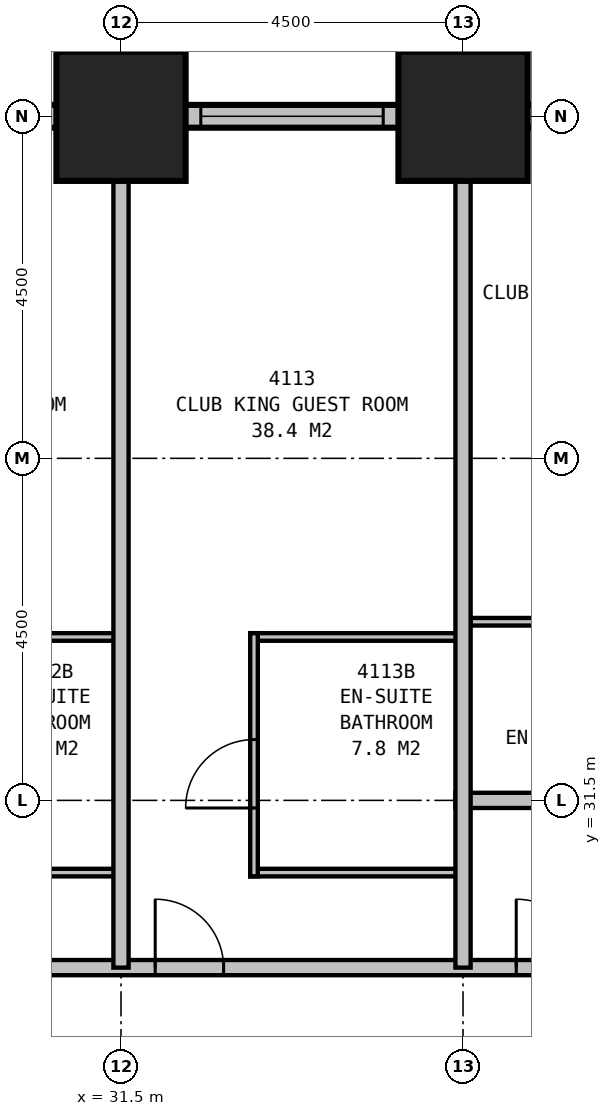
"""IFC4 building model, lengths in metres.
Left out: names, types, materials, properties, quantities, classifications, styles, units other than length and angle.
Written with IfcOpenShell. Run it as: python <this file> out.ifc"""

import sys

from ifc_helpers import new_model, si_unit, direction, frame, frame_2d, origin, origin_2d, place, context, subcontext, project, spatial, rectangle, extrude, element, fill, save


model = new_model("IFC4")
c1 = context("Model", 3, precision=1e-05, world=origin(), true_north=direction((0.0, 1.0)))
c2 = subcontext(c1, "Body", "Model", "MODEL_VIEW")
j1 = project(units=[si_unit("LENGTHUNIT", "METRE"), si_unit("PLANEANGLEUNIT", "RADIAN")], contexts=[c1])
p1 = place(None, origin())
s1 = spatial("IfcSite", under=j1, at=p1, CompositionType="ELEMENT")
p2 = place(p1, origin())
s2 = spatial("IfcBuilding", under=s1, at=p2, CompositionType="ELEMENT")
p3 = place(p2, frame((0.0, 0.0, 162.4)))
s3 = spatial("IfcBuildingStorey", under=s2, at=p3, CompositionType="ELEMENT", Elevation=162.4)
for number, where, z_axis, x_axis in (
    (1, (36.0, 40.5, 0.0), (0.0, 0.0, 1.0), (1.0, 0.0, 0.0)),
    (2, (31.5, 40.5, 0.0), (0.0, 0.0, 1.0), (1.0, 0.0, 0.0)),
):
    element("IfcColumn", number, at=place(p3, frame(where, z_axis=z_axis, x_axis=x_axis)), inside=s3, PredefinedType="COLUMN", context=c2, shape_type="SweptSolid", body=[
        extrude(rectangle(XDim=1.7, YDim=1.7, at=origin_2d()), origin(), (0.0, 0.0, 1.0), 3.5),
    ])
p4 = place(p3, frame((40.65, 40.5, 0.0), z_axis=(0.0, 0.0, 1.0), x_axis=(-1.0, 0.0, 0.0)))
e3 = element("IfcWall", 3, at=p4, inside=s3, PredefinedType="STANDARD", context=c2, shape_type="SweptSolid", body=[
    extrude(rectangle(XDim=31.8, YDim=0.3, at=frame_2d((15.9, 0.0))), origin(), (0.0, 0.0, 1.0), 2.25),
])
p5 = place(p4, frame((1.2, 0.0, 0.5)))
e4 = element("IfcOpeningElement", 4, at=p5, cuts=e3, PredefinedType="OPENING", context=c2, shape_type="SweptSolid", body=[
    extrude(rectangle(XDim=2.4, YDim=1.6, at=frame_2d((1.2, 0.8))), frame((0.0, 0.16, 0.0), z_axis=(0.0, -1.0, 0.0), x_axis=(1.0, 0.0, 0.0)), (0.0, 0.0, 1.0), 0.32),
])
p6 = place(p4, frame((5.7, 0.0, 0.5)))
e5 = element("IfcOpeningElement", 5, at=p6, cuts=e3, PredefinedType="OPENING", context=c2, shape_type="SweptSolid", body=[
    extrude(rectangle(XDim=2.4, YDim=1.6, at=frame_2d((1.2, 0.8))), frame((0.0, 0.16, 0.0), z_axis=(0.0, -1.0, 0.0), x_axis=(1.0, 0.0, 0.0)), (0.0, 0.0, 1.0), 0.32),
])
p7 = place(p4, frame((10.2, 0.0, 0.5)))
e6 = element("IfcOpeningElement", 6, at=p7, cuts=e3, PredefinedType="OPENING", context=c2, shape_type="SweptSolid", body=[
    extrude(rectangle(XDim=2.4, YDim=1.6, at=frame_2d((1.2, 0.8))), frame((0.0, 0.16, 0.0), z_axis=(0.0, -1.0, 0.0), x_axis=(1.0, 0.0, 0.0)), (0.0, 0.0, 1.0), 0.32),
])
p8 = place(p4, frame((14.7, 0.0, 0.5)))
e7 = element("IfcOpeningElement", 7, at=p8, cuts=e3, PredefinedType="OPENING", context=c2, shape_type="SweptSolid", body=[
    extrude(rectangle(XDim=2.4, YDim=1.6, at=frame_2d((1.2, 0.8))), frame((0.0, 0.16, 0.0), z_axis=(0.0, -1.0, 0.0), x_axis=(1.0, 0.0, 0.0)), (0.0, 0.0, 1.0), 0.32),
])
p9 = place(p4, frame((19.2, 0.0, 0.5)))
e8 = element("IfcOpeningElement", 8, at=p9, cuts=e3, PredefinedType="OPENING", context=c2, shape_type="SweptSolid", body=[
    extrude(rectangle(XDim=2.4, YDim=1.6, at=frame_2d((1.2, 0.8))), frame((0.0, 0.16, 0.0), z_axis=(0.0, -1.0, 0.0), x_axis=(1.0, 0.0, 0.0)), (0.0, 0.0, 1.0), 0.32),
])
p10 = place(p4, frame((23.7, 0.0, 0.5)))
e9 = element("IfcOpeningElement", 9, at=p10, cuts=e3, PredefinedType="OPENING", context=c2, shape_type="SweptSolid", body=[
    extrude(rectangle(XDim=2.4, YDim=1.6, at=frame_2d((1.2, 0.8))), frame((0.0, 0.16, 0.0), z_axis=(0.0, -1.0, 0.0), x_axis=(1.0, 0.0, 0.0)), (0.0, 0.0, 1.0), 0.32),
])
p11 = place(p4, frame((28.2, 0.0, 0.5)))
e10 = element("IfcOpeningElement", 10, at=p11, cuts=e3, PredefinedType="OPENING", context=c2, shape_type="SweptSolid", body=[
    extrude(rectangle(XDim=2.4, YDim=1.6, at=frame_2d((1.2, 0.8))), frame((0.0, 0.16, 0.0), z_axis=(0.0, -1.0, 0.0), x_axis=(1.0, 0.0, 0.0)), (0.0, 0.0, 1.0), 0.32),
])
p12 = place(p3, frame((11.2, 29.3, 0.0), z_axis=(0.0, 0.0, 1.0), x_axis=(1.0, 0.0, 0.0)))
e11 = element("IfcWall", 11, at=p12, inside=s3, PredefinedType="PARTITIONING", context=c2, shape_type="SweptSolid", body=[
    extrude(rectangle(XDim=27.1, YDim=0.2, at=frame_2d((13.55, 0.0))), origin(), (0.0, 0.0, 1.0), 3.25),
])
p13 = place(p12, frame((2.75, 0.0, 0.0)))
e12 = element("IfcOpeningElement", 12, at=p13, cuts=e11, PredefinedType="OPENING", context=c2, shape_type="SweptSolid", body=[
    extrude(rectangle(XDim=0.9, YDim=2.1, at=frame_2d((0.45, 1.05))), frame((0.0, 0.11, 0.0), z_axis=(0.0, -1.0, 0.0), x_axis=(1.0, 0.0, 0.0)), (0.0, 0.0, 1.0), 0.22),
])
p14 = place(p12, frame((9.55, 0.0, 0.0)))
e13 = element("IfcOpeningElement", 13, at=p14, cuts=e11, PredefinedType="OPENING", context=c2, shape_type="SweptSolid", body=[
    extrude(rectangle(XDim=0.9, YDim=2.1, at=frame_2d((0.45, 1.05))), frame((0.0, 0.11, 0.0), z_axis=(0.0, -1.0, 0.0), x_axis=(1.0, 0.0, 0.0)), (0.0, 0.0, 1.0), 0.22),
])
p15 = place(p12, frame((16.25, 0.0, 0.0)))
e14 = element("IfcOpeningElement", 14, at=p15, cuts=e11, PredefinedType="OPENING", context=c2, shape_type="SweptSolid", body=[
    extrude(rectangle(XDim=0.9, YDim=2.1, at=frame_2d((0.45, 1.05))), frame((0.0, 0.11, 0.0), z_axis=(0.0, -1.0, 0.0), x_axis=(1.0, 0.0, 0.0)), (0.0, 0.0, 1.0), 0.22),
])
p16 = place(p12, frame((20.75, 0.0, 0.0)))
e15 = element("IfcOpeningElement", 15, at=p16, cuts=e11, PredefinedType="OPENING", context=c2, shape_type="SweptSolid", body=[
    extrude(rectangle(XDim=0.9, YDim=2.1, at=frame_2d((0.45, 1.05))), frame((0.0, 0.11, 0.0), z_axis=(0.0, -1.0, 0.0), x_axis=(1.0, 0.0, 0.0)), (0.0, 0.0, 1.0), 0.22),
])
p17 = place(p12, frame((25.5, 0.0, 0.0)))
e16 = element("IfcOpeningElement", 16, at=p17, cuts=e11, PredefinedType="OPENING", context=c2, shape_type="SweptSolid", body=[
    extrude(rectangle(XDim=0.9, YDim=2.1, at=frame_2d((0.45, 1.05))), frame((0.0, 0.11, 0.0), z_axis=(0.0, -1.0, 0.0), x_axis=(1.0, 0.0, 0.0)), (0.0, 0.0, 1.0), 0.22),
])
p18 = place(p12, frame((0.7, 0.0, 0.0)))
e17 = element("IfcOpeningElement", 17, at=p18, cuts=e11, PredefinedType="OPENING", context=c2, shape_type="SweptSolid", body=[
    extrude(rectangle(XDim=0.9, YDim=2.1, at=frame_2d((0.45, 1.05))), frame((0.0, 0.11, 0.0), z_axis=(0.0, -1.0, 0.0), x_axis=(1.0, 0.0, 0.0)), (0.0, 0.0, 1.0), 0.22),
])
p19 = place(p3, frame((31.5, 29.3, 0.0), z_axis=(0.0, 0.0, 1.0), x_axis=(0.0, 1.0, 0.0)))
e18 = element("IfcWall", 18, at=p19, inside=s3, PredefinedType="PARTITIONING", context=c2, shape_type="SweptSolid", body=[
    extrude(rectangle(XDim=11.2, YDim=0.2, at=frame_2d((5.6, 0.0))), origin(), (0.0, 0.0, 1.0), 2.25),
])
for number, where, z_axis, x_axis in (
    (19, (28.7, 30.55, 0.0), (0.0, 0.0, 1.0), (1.0, 0.0, 0.0)),
    (20, (28.7, 33.65, 0.0), (0.0, 0.0, 1.0), (1.0, 0.0, 0.0)),
    (21, (33.2, 30.55, 0.0), (0.0, 0.0, 1.0), (1.0, 0.0, 0.0)),
    (22, (33.2, 33.65, 0.0), (0.0, 0.0, 1.0), (1.0, 0.0, 0.0)),
):
    element("IfcWall", number, at=place(p3, frame(where, z_axis=z_axis, x_axis=x_axis)), inside=s3, PredefinedType="PLUMBINGWALL", context=c2, shape_type="SweptSolid", body=[
        extrude(rectangle(XDim=2.8, YDim=0.1, at=frame_2d((1.4, 0.0))), origin(), (0.0, 0.0, 1.0), 3.25),
    ])
p20 = place(p3, frame((33.25, 30.5, 0.0), z_axis=(0.0, 0.0, 1.0), x_axis=(0.0, 1.0, 0.0)))
e23 = element("IfcWall", 23, at=p20, inside=s3, PredefinedType="PLUMBINGWALL", context=c2, shape_type="SweptSolid", body=[
    extrude(rectangle(XDim=3.2, YDim=0.1, at=frame_2d((1.6, 0.0))), origin(), (0.0, 0.0, 1.0), 3.25),
])
p21 = place(p20, frame((0.9, 0.0, 0.0)))
e24 = element("IfcOpeningElement", 24, at=p21, cuts=e23, PredefinedType="OPENING", context=c2, shape_type="SweptSolid", body=[
    extrude(rectangle(XDim=0.9, YDim=2.1, at=frame_2d((0.45, 1.05))), frame((0.0, 0.06, 0.0), z_axis=(0.0, -1.0, 0.0), x_axis=(1.0, 0.0, 0.0)), (0.0, 0.0, 1.0), 0.12),
])
p22 = place(p3, frame((36.0, 29.3, 0.0), z_axis=(0.0, 0.0, 1.0), x_axis=(0.0, 1.0, 0.0)))
e25 = element("IfcWall", 25, at=p22, inside=s3, PredefinedType="PARTITIONING", context=c2, shape_type="SweptSolid", body=[
    extrude(rectangle(XDim=11.2, YDim=0.2, at=frame_2d((5.6, 0.0))), origin(), (0.0, 0.0, 1.0), 2.25),
])
p23 = place(p3, frame((35.9, 31.5, 0.0), z_axis=(0.0, 0.0, 1.0), x_axis=(1.0, 0.0, 0.0)))
e26 = element("IfcWall", 26, at=p23, inside=s3, PredefinedType="PARTITIONING", context=c2, shape_type="SweptSolid", body=[
    extrude(rectangle(XDim=10.099, YDim=0.2, at=frame_2d((5.05, 0.0))), origin(), (0.0, 0.0, 1.0), 3.25),
])
p24 = place(p23, frame((8.099, 0.0, 0.0)))
e27 = element("IfcOpeningElement", 27, at=p24, cuts=e26, PredefinedType="OPENING", context=c2, shape_type="SweptSolid", body=[
    extrude(rectangle(XDim=0.9, YDim=2.1, at=frame_2d((0.45, 1.05))), frame((0.0, 0.11, 0.0), z_axis=(0.0, -1.0, 0.0), x_axis=(1.0, 0.0, 0.0)), (0.0, 0.0, 1.0), 0.22),
])
p25 = place(p3, frame((36.1, 33.85, 0.0), z_axis=(0.0, 0.0, 1.0), x_axis=(1.0, 0.0, 0.0)))
e28 = element("IfcWall", 28, at=p25, inside=s3, PredefinedType="PLUMBINGWALL", context=c2, shape_type="SweptSolid", body=[
    extrude(rectangle(XDim=3.3, YDim=0.1, at=frame_2d((1.65, 0.0))), origin(), (0.0, 0.0, 1.0), 3.25),
])
p26 = place(p25, frame((0.9, 0.0, 0.0)))
e29 = element("IfcOpeningElement", 29, at=p26, cuts=e28, PredefinedType="OPENING", context=c2, shape_type="SweptSolid", body=[
    extrude(rectangle(XDim=0.9, YDim=2.1, at=frame_2d((0.45, 1.05))), frame((0.0, 0.06, 0.0), z_axis=(0.0, -1.0, 0.0), x_axis=(1.0, 0.0, 0.0)), (0.0, 0.0, 1.0), 0.12),
])
p27 = place(p6, origin())
e30 = element("IfcWindow", 30, at=p27, inside=s3, PartitioningType="SINGLE_PANEL", PredefinedType="WINDOW", context=c2, shape_type="SweptSolid", body=[
    extrude(rectangle(XDim=2.4, YDim=1.6, at=frame_2d((1.2, 0.8))), frame((0.0, 0.03, 0.0), z_axis=(0.0, -1.0, 0.0), x_axis=(1.0, 0.0, 0.0)), (0.0, 0.0, 1.0), 0.06),
])
fill(e5, e30)
p28 = place(p16, origin())
e31 = element("IfcDoor", 31, at=p28, inside=s3, OperationType="SINGLE_SWING_LEFT", PredefinedType="DOOR", context=c2, shape_type="SweptSolid", body=[
    extrude(rectangle(XDim=0.9, YDim=2.1, at=frame_2d((0.45, 1.05))), frame((0.0, 0.025, 0.0), z_axis=(0.0, -1.0, 0.0), x_axis=(1.0, 0.0, 0.0)), (0.0, 0.0, 1.0), 0.05),
])
fill(e15, e31)
p29 = place(p17, origin())
e32 = element("IfcDoor", 32, at=p29, inside=s3, OperationType="SINGLE_SWING_LEFT", PredefinedType="DOOR", context=c2, shape_type="SweptSolid", body=[
    extrude(rectangle(XDim=0.9, YDim=2.1, at=frame_2d((0.45, 1.05))), frame((0.0, 0.025, 0.0), z_axis=(0.0, -1.0, 0.0), x_axis=(1.0, 0.0, 0.0)), (0.0, 0.0, 1.0), 0.05),
])
fill(e16, e32)
p30 = place(p21, origin())
e33 = element("IfcDoor", 33, at=p30, inside=s3, OperationType="SINGLE_SWING_LEFT", PredefinedType="DOOR", context=c2, shape_type="SweptSolid", body=[
    extrude(rectangle(XDim=0.9, YDim=2.1, at=frame_2d((0.45, 1.05))), frame((0.0, 0.025, 0.0), z_axis=(0.0, -1.0, 0.0), x_axis=(1.0, 0.0, 0.0)), (0.0, 0.0, 1.0), 0.05),
])
fill(e24, e33)
save(model, sys.argv[1])
